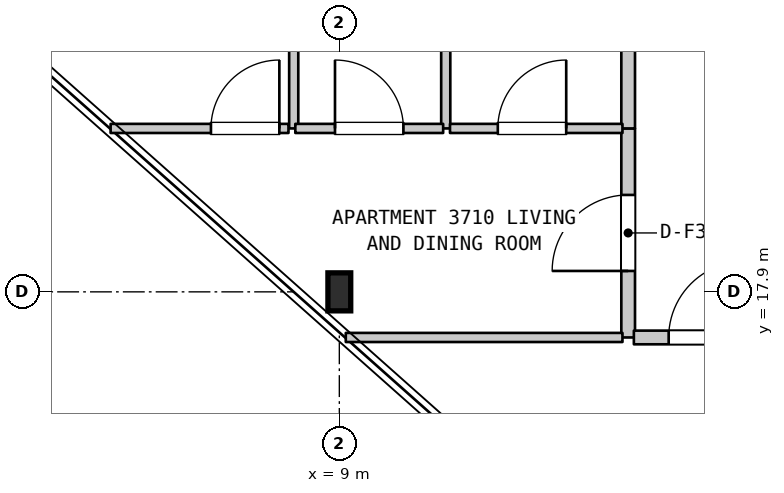
"""IFC4 building model, lengths in metres.
Left out: names, types, materials, properties, quantities, classifications, styles, units other than length and angle.
Written with IfcOpenShell. Run it as: python <this file> out.ifc"""

import sys

from ifc_helpers import new_model, si_unit, direction, frame, frame_2d, origin, origin_2d, place, context, subcontext, project, spatial, rectangle, i_section, extrude, element, fill, save


model = new_model("IFC4")
c1 = context("Model", 3, precision=1e-05, world=origin(), true_north=direction((0.0, 1.0)))
c2 = subcontext(c1, "Body", "Model", "MODEL_VIEW")
j1 = project(units=[si_unit("LENGTHUNIT", "METRE"), si_unit("PLANEANGLEUNIT", "RADIAN")], contexts=[c1])
p1 = place(None, origin())
s1 = spatial("IfcSite", under=j1, at=p1, CompositionType="ELEMENT")
p2 = place(p1, origin())
s2 = spatial("IfcBuilding", under=s1, at=p2, CompositionType="ELEMENT")
p3 = place(p2, frame((0.0, 0.0, 152.0)))
s3 = spatial("IfcBuildingStorey", under=s2, at=p3, CompositionType="ELEMENT", Elevation=152.0)
p4 = place(p3, frame((9.0, 17.9, 0.0), z_axis=(0.0, 0.0, 1.0), x_axis=(1.0, 0.0, 0.0)))
e1 = element("IfcColumn", 1, at=p4, inside=s3, PredefinedType="COLUMN", context=c2, shape_type="SweptSolid", body=[
    extrude(i_section(OverallWidth=0.3, OverallDepth=0.5, WebThickness=0.014, FlangeThickness=0.028, FilletRadius=0.027, at=origin_2d()), origin(), (0.0, 0.0, 1.0), 3.7),
])
for number, where, z_axis, x_axis in (
    (2, (8.4, 20.05, 0.0), (0.0, 0.0, 1.0), (0.0, 1.0, 0.0)),
    (3, (10.4, 20.05, 0.0), (0.0, 0.0, 1.0), (0.0, 1.0, 0.0)),
):
    element("IfcWall", number, at=place(p3, frame(where, z_axis=z_axis, x_axis=x_axis)), inside=s3, PredefinedType="PARTITIONING", context=c2, shape_type="SweptSolid", body=[
        extrude(rectangle(XDim=5.46, YDim=0.12, at=frame_2d((2.73, 0.0))), origin(), (0.0, 0.0, 1.0), 3.385),
    ])
p5 = place(p3, frame((12.8, 17.3, 0.0), z_axis=(0.0, 0.0, 1.0), x_axis=(0.0, 1.0, 0.0)))
e4 = element("IfcWall", 4, at=p5, inside=s3, PredefinedType="STANDARD", context=c2, shape_type="SweptSolid", body=[
    extrude(rectangle(XDim=2.75, YDim=0.18, at=frame_2d((1.375, 0.0))), origin(), (0.0, 0.0, 1.0), 3.385),
])
p6 = place(p5, frame((0.875, 0.0, 0.0)))
e5 = element("IfcOpeningElement", 5, at=p6, cuts=e4, PredefinedType="OPENING", context=c2, shape_type="SweptSolid", body=[
    extrude(rectangle(XDim=1.0, YDim=2.15, at=frame_2d((0.5, 1.075))), frame((0.0, 0.1, 0.0), z_axis=(0.0, -1.0, 0.0), x_axis=(1.0, 0.0, 0.0)), (0.0, 0.0, 1.0), 0.2),
])
p7 = place(p3, frame((12.8, 20.05, 0.0), z_axis=(0.0, 0.0, 1.0), x_axis=(0.0, 1.0, 0.0)))
e6 = element("IfcWall", 6, at=p7, inside=s3, PredefinedType="STANDARD", context=c2, shape_type="SweptSolid", body=[
    extrude(rectangle(XDim=5.46, YDim=0.18, at=frame_2d((2.73, 0.0))), origin(), (0.0, 0.0, 1.0), 3.385),
])
p8 = place(p3, frame((9.085, 17.3, 0.0), z_axis=(0.0, 0.0, 1.0), x_axis=(1.0, 0.0, 0.0)))
e7 = element("IfcWall", 7, at=p8, inside=s3, PredefinedType="PARTITIONING", context=c2, shape_type="SweptSolid", body=[
    extrude(rectangle(XDim=3.64, YDim=0.12, at=frame_2d((1.82, 0.0))), origin(), (0.0, 0.0, 1.0), 3.385),
])
p9 = place(p3, frame((12.875, 17.3, 0.0), z_axis=(0.0, 0.0, 1.0), x_axis=(1.0, 0.0, 0.0)))
e8 = element("IfcWall", 8, at=p9, inside=s3, PredefinedType="STANDARD", context=c2, shape_type="SweptSolid", body=[
    extrude(rectangle(XDim=3.78, YDim=0.18, at=frame_2d((1.89, 0.0))), origin(), (0.0, 0.0, 1.0), 3.385),
])
p10 = place(p9, frame((0.458, 0.0, 0.0)))
e9 = element("IfcOpeningElement", 9, at=p10, cuts=e8, PredefinedType="OPENING", context=c2, shape_type="SweptSolid", body=[
    extrude(rectangle(XDim=1.0, YDim=2.15, at=frame_2d((0.5, 1.075))), frame((0.0, 0.1, 0.0), z_axis=(0.0, -1.0, 0.0), x_axis=(1.0, 0.0, 0.0)), (0.0, 0.0, 1.0), 0.2),
])
p11 = place(p3, frame((5.991, 20.05, 0.0), z_axis=(0.0, 0.0, 1.0), x_axis=(1.0, 0.0, 0.0)))
e10 = element("IfcWall", 10, at=p11, inside=s3, PredefinedType="PARTITIONING", context=c2, shape_type="SweptSolid", body=[
    extrude(rectangle(XDim=2.34, YDim=0.12, at=frame_2d((1.17, 0.0))), origin(), (0.0, 0.0, 1.0), 3.385),
])
p12 = place(p11, frame((1.32, 0.0, 0.0)))
e11 = element("IfcOpeningElement", 11, at=p12, cuts=e10, PredefinedType="OPENING", context=c2, shape_type="SweptSolid", body=[
    extrude(rectangle(XDim=0.9, YDim=2.15, at=frame_2d((0.45, 1.075))), frame((0.0, 0.07, 0.0), z_axis=(0.0, -1.0, 0.0), x_axis=(1.0, 0.0, 0.0)), (0.0, 0.0, 1.0), 0.14),
])
p13 = place(p3, frame((8.421, 20.05, 0.0), z_axis=(0.0, 0.0, 1.0), x_axis=(1.0, 0.0, 0.0)))
e12 = element("IfcWall", 12, at=p13, inside=s3, PredefinedType="PARTITIONING", context=c2, shape_type="SweptSolid", body=[
    extrude(rectangle(XDim=1.945, YDim=0.12, at=frame_2d((0.973, 0.0))), origin(), (0.0, 0.0, 1.0), 3.385),
])
p14 = place(p13, frame((0.522, 0.0, 0.0)))
e13 = element("IfcOpeningElement", 13, at=p14, cuts=e12, PredefinedType="OPENING", context=c2, shape_type="SweptSolid", body=[
    extrude(rectangle(XDim=0.9, YDim=2.15, at=frame_2d((0.45, 1.075))), frame((0.0, 0.07, 0.0), z_axis=(0.0, -1.0, 0.0), x_axis=(1.0, 0.0, 0.0)), (0.0, 0.0, 1.0), 0.14),
])
p15 = place(p3, frame((10.456, 20.05, 0.0), z_axis=(0.0, 0.0, 1.0), x_axis=(1.0, 0.0, 0.0)))
e14 = element("IfcWall", 14, at=p15, inside=s3, PredefinedType="PARTITIONING", context=c2, shape_type="SweptSolid", body=[
    extrude(rectangle(XDim=2.269, YDim=0.12, at=frame_2d((1.135, 0.0))), origin(), (0.0, 0.0, 1.0), 3.385),
])
p16 = place(p15, frame((0.629, 0.0, 0.0)))
e15 = element("IfcOpeningElement", 15, at=p16, cuts=e14, PredefinedType="OPENING", context=c2, shape_type="SweptSolid", body=[
    extrude(rectangle(XDim=0.9, YDim=2.1, at=frame_2d((0.45, 1.05))), frame((0.0, 0.07, 0.0), z_axis=(0.0, -1.0, 0.0), x_axis=(1.0, 0.0, 0.0)), (0.0, 0.0, 1.0), 0.14),
])
p17 = place(p6, origin())
e16 = element("IfcDoor", 16, at=p17, inside=s3, OperationType="SINGLE_SWING_LEFT", PredefinedType="DOOR", context=c2, shape_type="SweptSolid", body=[
    extrude(rectangle(XDim=1.0, YDim=2.15, at=frame_2d((0.5, 1.075))), frame((0.0, 0.025, 0.0), z_axis=(0.0, -1.0, 0.0), x_axis=(1.0, 0.0, 0.0)), (0.0, 0.0, 1.0), 0.05),
])
fill(e5, e16)
p18 = place(p10, origin())
e17 = element("IfcDoor", 17, at=p18, inside=s3, OperationType="SINGLE_SWING_RIGHT", PredefinedType="DOOR", context=c2, shape_type="SweptSolid", body=[
    extrude(rectangle(XDim=1.0, YDim=2.15, at=frame_2d((0.5, 1.075))), frame((0.0, 0.025, 0.0), z_axis=(0.0, -1.0, 0.0), x_axis=(1.0, 0.0, 0.0)), (0.0, 0.0, 1.0), 0.05),
])
fill(e9, e17)
p19 = place(p12, origin())
e18 = element("IfcDoor", 18, at=p19, inside=s3, OperationType="SINGLE_SWING_RIGHT", PredefinedType="DOOR", context=c2, shape_type="SweptSolid", body=[
    extrude(rectangle(XDim=0.9, YDim=2.15, at=frame_2d((0.45, 1.075))), frame((0.0, 0.025, 0.0), z_axis=(0.0, -1.0, 0.0), x_axis=(1.0, 0.0, 0.0)), (0.0, 0.0, 1.0), 0.05),
])
fill(e11, e18)
p20 = place(p14, origin())
e19 = element("IfcDoor", 19, at=p20, inside=s3, OperationType="SINGLE_SWING_LEFT", PredefinedType="DOOR", context=c2, shape_type="SweptSolid", body=[
    extrude(rectangle(XDim=0.9, YDim=2.15, at=frame_2d((0.45, 1.075))), frame((0.0, 0.025, 0.0), z_axis=(0.0, -1.0, 0.0), x_axis=(1.0, 0.0, 0.0)), (0.0, 0.0, 1.0), 0.05),
])
fill(e13, e19)
p21 = place(p16, origin())
e20 = element("IfcDoor", 20, at=p21, inside=s3, OperationType="SINGLE_SWING_RIGHT", PredefinedType="DOOR", context=c2, shape_type="SweptSolid", body=[
    extrude(rectangle(XDim=0.9, YDim=2.1, at=frame_2d((0.45, 1.05))), frame((0.0, 0.025, 0.0), z_axis=(0.0, -1.0, 0.0), x_axis=(1.0, 0.0, 0.0)), (0.0, 0.0, 1.0), 0.05),
])
fill(e15, e20)
save(model, sys.argv[1])
